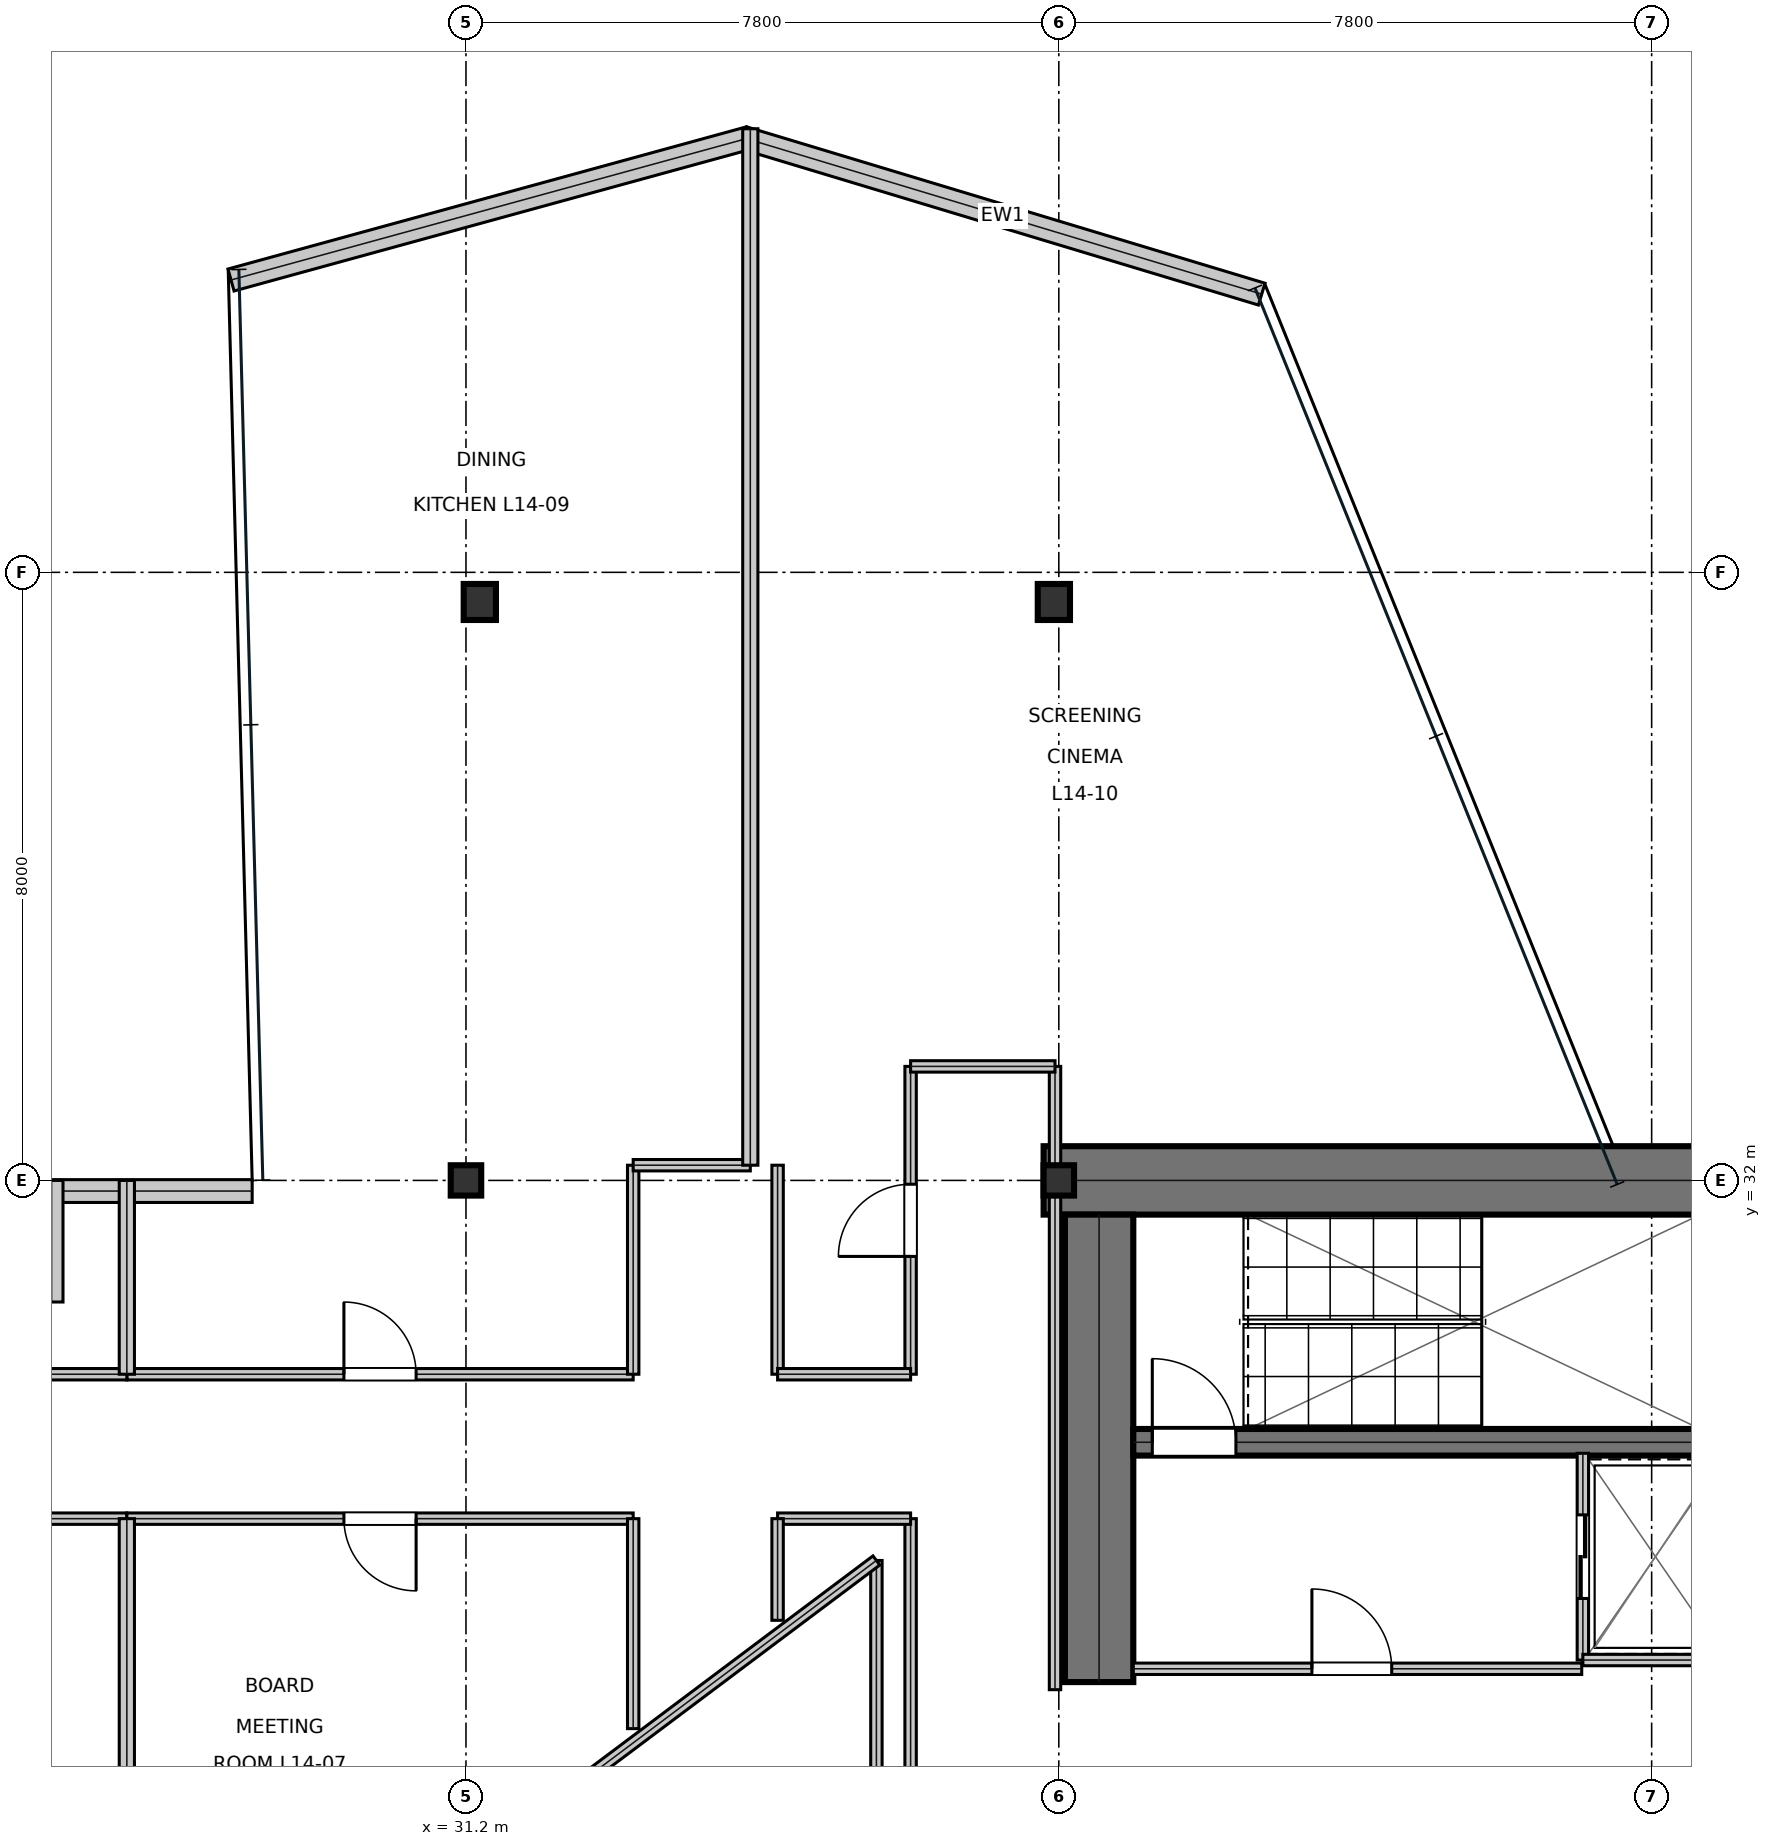
"""IFC4 building model, lengths in metres.
Left out: names, types, materials, properties, quantities, classifications, styles, units other than length and angle.
Written with IfcOpenShell. Run it as: python <this file> out.ifc"""

import sys

from ifc_helpers import new_model, si_unit, direction, frame, frame_2d, origin, origin_2d, place, context, subcontext, project, spatial, rectangle, i_section, extrude, element, fill, save


model = new_model("IFC4")
c1 = context("Model", 3, precision=1e-05, world=origin(), true_north=direction((0.0, 1.0)))
c2 = subcontext(c1, "Body", "Model", "MODEL_VIEW")
j1 = project(units=[si_unit("LENGTHUNIT", "METRE"), si_unit("PLANEANGLEUNIT", "RADIAN")], contexts=[c1])
p1 = place(None, origin())
s1 = spatial("IfcSite", under=j1, at=p1, CompositionType="ELEMENT")
p2 = place(p1, origin())
s2 = spatial("IfcBuilding", under=s1, at=p2, CompositionType="ELEMENT")
p3 = place(p2, frame((0.0, 0.0, 66.15)))
s3 = spatial("IfcBuildingStorey", under=s2, at=p3, CompositionType="ELEMENT", Elevation=66.15)
p4 = place(p3, frame((38.8, 32.0, 0.0), z_axis=(0.0, 0.0, 1.0), x_axis=(1.0, 0.0, 0.0)))
e1 = element("IfcWall", 1, at=p4, inside=s3, PredefinedType="SHEAR", context=c2, shape_type="SweptSolid", body=[
    extrude(rectangle(XDim=16.0, YDim=0.9, at=frame_2d((8.0, 0.0))), origin(), (0.0, 0.0, 1.0), 3.81),
])
p5 = place(p3, frame((39.53, 25.4, 0.0), z_axis=(0.0, 0.0, 1.0), x_axis=(0.0, 1.0, 0.0)))
e2 = element("IfcWall", 2, at=p5, inside=s3, PredefinedType="SHEAR", context=c2, shape_type="SweptSolid", body=[
    extrude(rectangle(XDim=6.15, YDim=0.9, at=frame_2d((3.075, 0.0))), origin(), (0.0, 0.0, 1.0), 3.81),
])
p6 = place(p3, frame((39.98, 28.555, 0.0), z_axis=(0.0, 0.0, 1.0), x_axis=(1.0, 0.0, 0.0)))
e3 = element("IfcWall", 3, at=p6, inside=s3, PredefinedType="SHEAR", context=c2, shape_type="SweptSolid", body=[
    extrude(rectangle(XDim=7.71, YDim=0.35, at=frame_2d((3.855, 0.0))), origin(), (0.0, 0.0, 1.0), 3.81),
])
p7 = place(p6, frame((0.25, 0.0, 0.0)))
e4 = element("IfcOpeningElement", 4, at=p7, cuts=e3, PredefinedType="OPENING", context=c2, shape_type="SweptSolid", body=[
    extrude(rectangle(XDim=1.1, YDim=2.15, at=frame_2d((0.55, 1.075))), frame((0.0, 0.185, 0.0), z_axis=(0.0, -1.0, 0.0), x_axis=(1.0, 0.0, 0.0)), (0.0, 0.0, 1.0), 0.37),
])
for number, where, z_axis, x_axis in (
    (5, (31.2, 32.0, 0.0), (0.0, 0.0, 1.0), (1.0, 0.0, 0.0)),
    (6, (39.0, 32.0, 0.0), (0.0, 0.0, 1.0), (1.0, 0.0, 0.0)),
):
    element("IfcColumn", number, at=place(p3, frame(where, z_axis=z_axis, x_axis=x_axis)), inside=s3, PredefinedType="COLUMN", context=c2, shape_type="SweptSolid", body=[
        extrude(i_section(OverallWidth=0.401, OverallDepth=0.399, WebThickness=0.025, FlangeThickness=0.04, at=origin_2d()), origin(), (0.0, 0.0, 1.0), 4.044),
    ])
for number, where, z_axis, x_axis in (
    (7, (31.382, 39.61, 0.016), (0.0, 0.0, 1.0), (1.0, 0.0, 0.0)),
    (8, (38.935, 39.61, 0.016), (0.0, 0.0, 1.0), (1.0, 0.0, 0.0)),
):
    element("IfcColumn", number, at=place(p3, frame(where, z_axis=z_axis, x_axis=x_axis)), inside=s3, PredefinedType="COLUMN", context=c2, shape_type="SweptSolid", body=[
        extrude(i_section(OverallWidth=0.424, OverallDepth=0.474, WebThickness=0.048, FlangeThickness=0.077, at=origin_2d()), origin(), (0.0, 0.0, 1.0), 4.018),
    ])
p8 = place(p3, frame((41.67, 43.66, 0.0), z_axis=(0.0, 0.0, 1.0), x_axis=(-0.957387451844, 0.288806625707, 0.0)))
e9 = element("IfcWall", 9, at=p8, inside=s3, PredefinedType="STANDARD", context=c2, shape_type="SweptSolid", body=[
    extrude(rectangle(XDim=7.123, YDim=0.3, at=frame_2d((3.562, 0.0))), origin(), (0.0, 0.0, 1.0), 3.81),
])
p9 = place(p3, frame((34.928, 45.716, 0.0), z_axis=(0.0, 0.0, 1.0), x_axis=(-0.96439075506, -0.264481514581, 0.0)))
e10 = element("IfcWall", 10, at=p9, inside=s3, PredefinedType="STANDARD", context=c2, shape_type="SweptSolid", body=[
    extrude(rectangle(XDim=7.071, YDim=0.3, at=frame_2d((3.535, 0.0))), origin(), (0.0, 0.0, 1.0), 3.81),
])
p10 = place(p3, frame((28.387, 31.86, 0.0), z_axis=(0.0, 0.0, 1.0), x_axis=(-1.0, 0.0, 0.0)))
e11 = element("IfcWall", 11, at=p10, inside=s3, PredefinedType="STANDARD", context=c2, shape_type="SweptSolid", body=[
    extrude(rectangle(XDim=2.779, YDim=0.3, at=frame_2d((1.39, 0.0))), origin(), (0.0, 0.0, 1.0), 3.81),
])
p11 = place(p3, frame((25.748, 32.0, 0.0), z_axis=(0.0, 0.0, 1.0), x_axis=(0.0, -1.0, 0.0)))
e12 = element("IfcWall", 12, at=p11, inside=s3, PredefinedType="STANDARD", context=c2, shape_type="SweptSolid", body=[
    extrude(rectangle(XDim=1.6, YDim=0.3, at=frame_2d((0.8, 0.0))), origin(), (0.0, 0.0, 1.0), 3.338),
])
p12 = place(p3, frame((39.98, 25.575, 0.0), z_axis=(0.0, 0.0, 1.0), x_axis=(1.0, 0.0, 0.0)))
e13 = element("IfcWall", 13, at=p12, inside=s3, PredefinedType="PARTITIONING", context=c2, shape_type="SweptSolid", body=[
    extrude(rectangle(XDim=5.9, YDim=0.15, at=frame_2d((2.95, 0.0))), origin(), (0.0, 0.0, 1.0), 3.81),
])
p13 = place(p12, frame((2.35, 0.0, 0.0)))
e14 = element("IfcOpeningElement", 14, at=p13, cuts=e13, PredefinedType="OPENING", context=c2, shape_type="SweptSolid", body=[
    extrude(rectangle(XDim=1.05, YDim=2.15, at=frame_2d((0.525, 1.075))), frame((0.0, 0.085, 0.0), z_axis=(0.0, -1.0, 0.0), x_axis=(1.0, 0.0, 0.0)), (0.0, 0.0, 1.0), 0.17),
])
p14 = place(p3, frame((45.895, 25.69, 0.0), z_axis=(0.0, 0.0, 1.0), x_axis=(0.0, 1.0, 0.0)))
e15 = element("IfcWall", 15, at=p14, inside=s3, PredefinedType="PARTITIONING", context=c2, shape_type="SweptSolid", body=[
    extrude(rectangle(XDim=2.72, YDim=0.15, at=frame_2d((1.36, 0.0))), origin(), (0.0, 0.0, 1.0), 3.81),
])
p15 = place(p14, frame((0.81, 0.0, 0.0)))
e16 = element("IfcOpeningElement", 16, at=p15, cuts=e15, PredefinedType="OPENING", context=c2, shape_type="SweptSolid", body=[
    extrude(rectangle(XDim=1.1, YDim=2.15, at=frame_2d((0.55, 1.075))), frame((0.0, 0.085, 0.0), z_axis=(0.0, -1.0, 0.0), x_axis=(1.0, 0.0, 0.0)), (0.0, 0.0, 1.0), 0.17),
])
p16 = place(p3, frame((45.895, 25.69, 0.0), z_axis=(0.0, 0.0, 1.0), x_axis=(1.0, 0.0, 0.0)))
e17 = element("IfcWall", 17, at=p16, inside=s3, PredefinedType="PARTITIONING", context=c2, shape_type="SweptSolid", body=[
    extrude(rectangle(XDim=1.915, YDim=0.15, at=frame_2d((0.958, 0.0))), origin(), (0.0, 0.0, 1.0), 3.81),
])
p17 = place(p3, frame((37.05, 14.5, 0.0), z_axis=(0.0, 0.0, 1.0), x_axis=(0.0, 1.0, 0.0)))
e18 = element("IfcWall", 18, at=p17, inside=s3, PredefinedType="PARTITIONING", context=c2, shape_type="SweptSolid", body=[
    extrude(rectangle(XDim=13.05, YDim=0.15, at=frame_2d((6.525, 0.0))), origin(), (0.0, 0.0, 1.0), 3.181),
])
p18 = place(p17, frame((4.61, 0.0, 0.0)))
e19 = element("IfcOpeningElement", 19, at=p18, cuts=e18, PredefinedType="OPENING", context=c2, shape_type="SweptSolid", body=[
    extrude(rectangle(XDim=0.95, YDim=2.15, at=frame_2d((0.475, 1.075))), frame((0.0, 0.085, 0.0), z_axis=(0.0, -1.0, 0.0), x_axis=(1.0, 0.0, 0.0)), (0.0, 0.0, 1.0), 0.17),
])
p19 = place(p3, frame((21.4, 27.55, 0.0), z_axis=(0.0, 0.0, 1.0), x_axis=(1.0, 0.0, 0.0)))
e20 = element("IfcWall", 20, at=p19, inside=s3, PredefinedType="PARTITIONING", context=c2, shape_type="SweptSolid", body=[
    extrude(rectangle(XDim=5.338, YDim=0.15, at=frame_2d((2.669, 0.0))), origin(), (0.0, 0.0, 1.0), 3.391),
])
p20 = place(p19, frame((2.194, 0.0, 0.0)))
e21 = element("IfcOpeningElement", 21, at=p20, cuts=e20, PredefinedType="OPENING", context=c2, shape_type="SweptSolid", body=[
    extrude(rectangle(XDim=0.95, YDim=2.15, at=frame_2d((0.475, 1.075))), frame((0.0, 0.085, 0.0), z_axis=(0.0, -1.0, 0.0), x_axis=(1.0, 0.0, 0.0)), (0.0, 0.0, 1.0), 0.17),
])
p21 = place(p3, frame((26.738, 27.55, 0.0), z_axis=(0.0, 0.0, 1.0), x_axis=(1.0, 0.0, 0.0)))
e22 = element("IfcWall", 22, at=p21, inside=s3, PredefinedType="PARTITIONING", context=c2, shape_type="SweptSolid", body=[
    extrude(rectangle(XDim=6.662, YDim=0.15, at=frame_2d((3.331, 0.0))), origin(), (0.0, 0.0, 1.0), 3.181),
])
p22 = place(p21, frame((2.856, 0.0, 0.0)))
e23 = element("IfcOpeningElement", 23, at=p22, cuts=e22, PredefinedType="OPENING", context=c2, shape_type="SweptSolid", body=[
    extrude(rectangle(XDim=0.95, YDim=2.15, at=frame_2d((0.475, 1.075))), frame((0.0, 0.085, 0.0), z_axis=(0.0, -1.0, 0.0), x_axis=(1.0, 0.0, 0.0)), (0.0, 0.0, 1.0), 0.17),
])
p23 = place(p3, frame((26.738, 29.45, 0.0), z_axis=(0.0, 0.0, 1.0), x_axis=(1.0, 0.0, 0.0)))
e24 = element("IfcWall", 24, at=p23, inside=s3, PredefinedType="PARTITIONING", context=c2, shape_type="SweptSolid", body=[
    extrude(rectangle(XDim=6.662, YDim=0.15, at=frame_2d((3.331, 0.0))), origin(), (0.0, 0.0, 1.0), 3.181),
])
p24 = place(p23, frame((2.856, 0.0, 0.0)))
e25 = element("IfcOpeningElement", 25, at=p24, cuts=e24, PredefinedType="OPENING", context=c2, shape_type="SweptSolid", body=[
    extrude(rectangle(XDim=0.95, YDim=2.15, at=frame_2d((0.475, 1.075))), frame((0.0, 0.085, 0.0), z_axis=(0.0, -1.0, 0.0), x_axis=(1.0, 0.0, 0.0)), (0.0, 0.0, 1.0), 0.17),
])
p25 = place(p3, frame((37.05, 29.45, 0.0), z_axis=(0.0, 0.0, 1.0), x_axis=(0.0, 1.0, 0.0)))
e26 = element("IfcWall", 26, at=p25, inside=s3, PredefinedType="PARTITIONING", context=c2, shape_type="SweptSolid", body=[
    extrude(rectangle(XDim=4.05, YDim=0.15, at=frame_2d((2.025, 0.0))), origin(), (0.0, 0.0, 1.0), 3.181),
])
p26 = place(p25, frame((1.55, 0.0, 0.0)))
e27 = element("IfcOpeningElement", 27, at=p26, cuts=e26, PredefinedType="OPENING", context=c2, shape_type="SweptSolid", body=[
    extrude(rectangle(XDim=0.95, YDim=2.15, at=frame_2d((0.475, 1.075))), frame((0.0, 0.085, 0.0), z_axis=(0.0, -1.0, 0.0), x_axis=(1.0, 0.0, 0.0)), (0.0, 0.0, 1.0), 0.17),
])
p27 = place(p3, frame((35.3, 27.55, 0.0), z_axis=(0.0, 0.0, 1.0), x_axis=(1.0, 0.0, 0.0)))
e28 = element("IfcWall", 28, at=p27, inside=s3, PredefinedType="PARTITIONING", context=c2, shape_type="SweptSolid", body=[
    extrude(rectangle(XDim=1.75, YDim=0.15, at=frame_2d((0.875, 0.0))), origin(), (0.0, 0.0, 1.0), 3.391),
])
p28 = place(p3, frame((35.3, 26.212, 0.0), z_axis=(0.0, 0.0, 1.0), x_axis=(0.0, 1.0, 0.0)))
e29 = element("IfcWall", 29, at=p28, inside=s3, PredefinedType="PARTITIONING", context=c2, shape_type="SweptSolid", body=[
    extrude(rectangle(XDim=1.338, YDim=0.15, at=frame_2d((0.669, 0.0))), origin(), (0.0, 0.0, 1.0), 3.81),
])
p29 = place(p3, frame((33.4, 24.788, 0.0), z_axis=(0.0, 0.0, 1.0), x_axis=(0.0, 1.0, 0.0)))
e30 = element("IfcWall", 30, at=p29, inside=s3, PredefinedType="PARTITIONING", context=c2, shape_type="SweptSolid", body=[
    extrude(rectangle(XDim=2.762, YDim=0.15, at=frame_2d((1.381, 0.0))), origin(), (0.0, 0.0, 1.0), 3.81),
])
p30 = place(p3, frame((13.604, 29.45, 0.0), z_axis=(0.0, 0.0, 1.0), x_axis=(1.0, 0.0, 0.0)))
e31 = element("IfcWall", 31, at=p30, inside=s3, PredefinedType="PARTITIONING", context=c2, shape_type="SweptSolid", body=[
    extrude(rectangle(XDim=13.135, YDim=0.15, at=frame_2d((6.567, 0.0))), origin(), (0.0, 0.0, 1.0), 3.338),
])
p31 = place(p3, frame((33.4, 29.45, 0.0), z_axis=(0.0, 0.0, 1.0), x_axis=(0.0, 1.0, 0.0)))
e32 = element("IfcWall", 32, at=p31, inside=s3, PredefinedType="PARTITIONING", context=c2, shape_type="SweptSolid", body=[
    extrude(rectangle(XDim=2.75, YDim=0.15, at=frame_2d((1.375, 0.0))), origin(), (0.0, 0.0, 1.0), 3.181),
])
p32 = place(p3, frame((33.4, 32.2, 0.0), z_axis=(0.0, 0.0, 1.0), x_axis=(1.0, 0.0, 0.0)))
e33 = element("IfcWall", 33, at=p32, inside=s3, PredefinedType="PARTITIONING", context=c2, shape_type="SweptSolid", body=[
    extrude(rectangle(XDim=1.541, YDim=0.15, at=frame_2d((0.771, 0.0))), origin(), (0.0, 0.0, 1.0), 3.181),
])
p33 = place(p3, frame((38.95, 25.3, 0.0), z_axis=(0.0, 0.0, 1.0), x_axis=(0.0, 1.0, 0.0)))
e34 = element("IfcWall", 34, at=p33, inside=s3, PredefinedType="PARTITIONING", context=c2, shape_type="SweptSolid", body=[
    extrude(rectangle(XDim=8.2, YDim=0.15, at=frame_2d((4.1, 0.0))), origin(), (0.0, 0.0, 1.0), 3.181),
])
p34 = place(p3, frame((35.3, 29.45, 0.0), z_axis=(0.0, 0.0, 1.0), x_axis=(0.0, 1.0, 0.0)))
e35 = element("IfcWall", 35, at=p34, inside=s3, PredefinedType="PARTITIONING", context=c2, shape_type="SweptSolid", body=[
    extrude(rectangle(XDim=2.75, YDim=0.15, at=frame_2d((1.375, 0.0))), origin(), (0.0, 0.0, 1.0), 3.181),
])
p35 = place(p3, frame((37.05, 33.5, 0.0), z_axis=(0.0, 0.0, 1.0), x_axis=(1.0, 0.0, 0.0)))
e36 = element("IfcWall", 36, at=p35, inside=s3, PredefinedType="PARTITIONING", context=c2, shape_type="SweptSolid", body=[
    extrude(rectangle(XDim=1.9, YDim=0.15, at=frame_2d((0.95, 0.0))), origin(), (0.0, 0.0, 1.0), 3.81),
])
p36 = place(p3, frame((35.3, 29.45, 0.0), z_axis=(0.0, 0.0, 1.0), x_axis=(1.0, 0.0, 0.0)))
e37 = element("IfcWall", 37, at=p36, inside=s3, PredefinedType="PARTITIONING", context=c2, shape_type="SweptSolid", body=[
    extrude(rectangle(XDim=1.75, YDim=0.15, at=frame_2d((0.875, 0.0))), origin(), (0.0, 0.0, 1.0), 3.81),
])
p37 = place(p3, frame((26.738, 23.126, 0.0), z_axis=(0.0, 0.0, 1.0), x_axis=(0.0, 1.0, 0.0)))
e38 = element("IfcWall", 38, at=p37, inside=s3, PredefinedType="SOLIDWALL", context=c2, shape_type="SweptSolid", body=[
    extrude(rectangle(XDim=4.424, YDim=0.2, at=frame_2d((2.212, 0.0))), origin(), (0.0, 0.0, 1.0), 3.181),
])
p38 = place(p3, frame((26.738, 29.45, 0.0), z_axis=(0.0, 0.0, 1.0), x_axis=(0.0, 1.0, 0.0)))
e39 = element("IfcWall", 39, at=p38, inside=s3, PredefinedType="SOLIDWALL", context=c2, shape_type="SweptSolid", body=[
    extrude(rectangle(XDim=2.55, YDim=0.2, at=frame_2d((1.275, 0.0))), origin(), (0.0, 0.0, 1.0), 3.338),
])
p39 = place(p3, frame((34.941, 32.2, 0.0), z_axis=(0.0, 0.0, 1.0), x_axis=(0.0, 1.0, 0.0)))
e40 = element("IfcWall", 40, at=p39, inside=s3, PredefinedType="SOLIDWALL", context=c2, shape_type="SweptSolid", body=[
    extrude(rectangle(XDim=13.636, YDim=0.2, at=frame_2d((6.818, 0.0))), origin(), (0.0, 0.0, 1.0), 3.338),
])
p40 = place(p3, frame((36.6, 21.0, 0.0), z_axis=(0.0, 0.0, 1.0), x_axis=(0.0, 1.0, 0.0)))
e41 = element("IfcWall", 41, at=p40, inside=s3, PredefinedType="MOVABLE", context=c2, shape_type="SweptSolid", body=[
    extrude(rectangle(XDim=6.0, YDim=0.15, at=frame_2d((3.0, 0.0))), origin(), (0.0, 0.0, 1.0), 3.81),
])
p41 = place(p3, frame((36.6, 27.0, 0.0), z_axis=(0.0, 0.0, 1.0), x_axis=(-0.8, -0.6, 0.0)))
e42 = element("IfcWall", 42, at=p41, inside=s3, PredefinedType="MOVABLE", context=c2, shape_type="SweptSolid", body=[
    extrude(rectangle(XDim=5.0, YDim=0.15, at=frame_2d((2.5, 0.0))), origin(), (0.0, 0.0, 1.0), 3.81),
])
p42 = place(p13, origin())
e43 = element("IfcDoor", 43, at=p42, inside=s3, OperationType="SINGLE_SWING_LEFT", PredefinedType="DOOR", context=c2, shape_type="SweptSolid", body=[
    extrude(rectangle(XDim=1.05, YDim=2.15, at=frame_2d((0.525, 1.075))), frame((0.0, 0.025, 0.0), z_axis=(0.0, -1.0, 0.0), x_axis=(1.0, 0.0, 0.0)), (0.0, 0.0, 1.0), 0.05),
])
fill(e14, e43)
p43 = place(p15, frame((1.1, 0.0, 0.0), z_axis=(0.0, 0.0, 1.0), x_axis=(-1.0, 0.0, 0.0)))
e44 = element("IfcDoor", 44, at=p43, inside=s3, OperationType="DOUBLE_DOOR_SLIDING", PredefinedType="DOOR", context=c2, shape_type="SweptSolid", body=[
    extrude(rectangle(XDim=1.1, YDim=2.15, at=frame_2d((0.55, 1.075))), frame((0.0, 0.025, 0.0), z_axis=(0.0, -1.0, 0.0), x_axis=(1.0, 0.0, 0.0)), (0.0, 0.0, 1.0), 0.05),
])
fill(e16, e44)
p44 = place(p22, frame((0.95, 0.0, 0.0), z_axis=(0.0, 0.0, 1.0), x_axis=(-1.0, 0.0, 0.0)))
e45 = element("IfcDoor", 45, at=p44, inside=s3, OperationType="SINGLE_SWING_LEFT", PredefinedType="DOOR", context=c2, shape_type="SweptSolid", body=[
    extrude(rectangle(XDim=0.95, YDim=2.15, at=frame_2d((0.475, 1.075))), frame((0.0, 0.025, 0.0), z_axis=(0.0, -1.0, 0.0), x_axis=(1.0, 0.0, 0.0)), (0.0, 0.0, 1.0), 0.05),
])
fill(e23, e45)
p45 = place(p24, origin())
e46 = element("IfcDoor", 46, at=p45, inside=s3, OperationType="SINGLE_SWING_LEFT", PredefinedType="DOOR", context=c2, shape_type="SweptSolid", body=[
    extrude(rectangle(XDim=0.95, YDim=2.15, at=frame_2d((0.475, 1.075))), frame((0.0, 0.025, 0.0), z_axis=(0.0, -1.0, 0.0), x_axis=(1.0, 0.0, 0.0)), (0.0, 0.0, 1.0), 0.05),
])
fill(e25, e46)
p46 = place(p26, origin())
e47 = element("IfcDoor", 47, at=p46, inside=s3, OperationType="SINGLE_SWING_LEFT", PredefinedType="DOOR", context=c2, shape_type="SweptSolid", body=[
    extrude(rectangle(XDim=0.95, YDim=2.15, at=frame_2d((0.475, 1.075))), frame((0.0, 0.025, 0.0), z_axis=(0.0, -1.0, 0.0), x_axis=(1.0, 0.0, 0.0)), (0.0, 0.0, 1.0), 0.05),
])
fill(e27, e47)
p47 = place(p7, origin())
e48 = element("IfcDoor", 48, at=p47, inside=s3, OperationType="SINGLE_SWING_LEFT", PredefinedType="DOOR", context=c2, shape_type="SweptSolid", body=[
    extrude(rectangle(XDim=1.1, YDim=2.15, at=frame_2d((0.55, 1.075))), frame((0.0, 0.025, 0.0), z_axis=(0.0, -1.0, 0.0), x_axis=(1.0, 0.0, 0.0)), (0.0, 0.0, 1.0), 0.05),
])
fill(e4, e48)
save(model, sys.argv[1])
